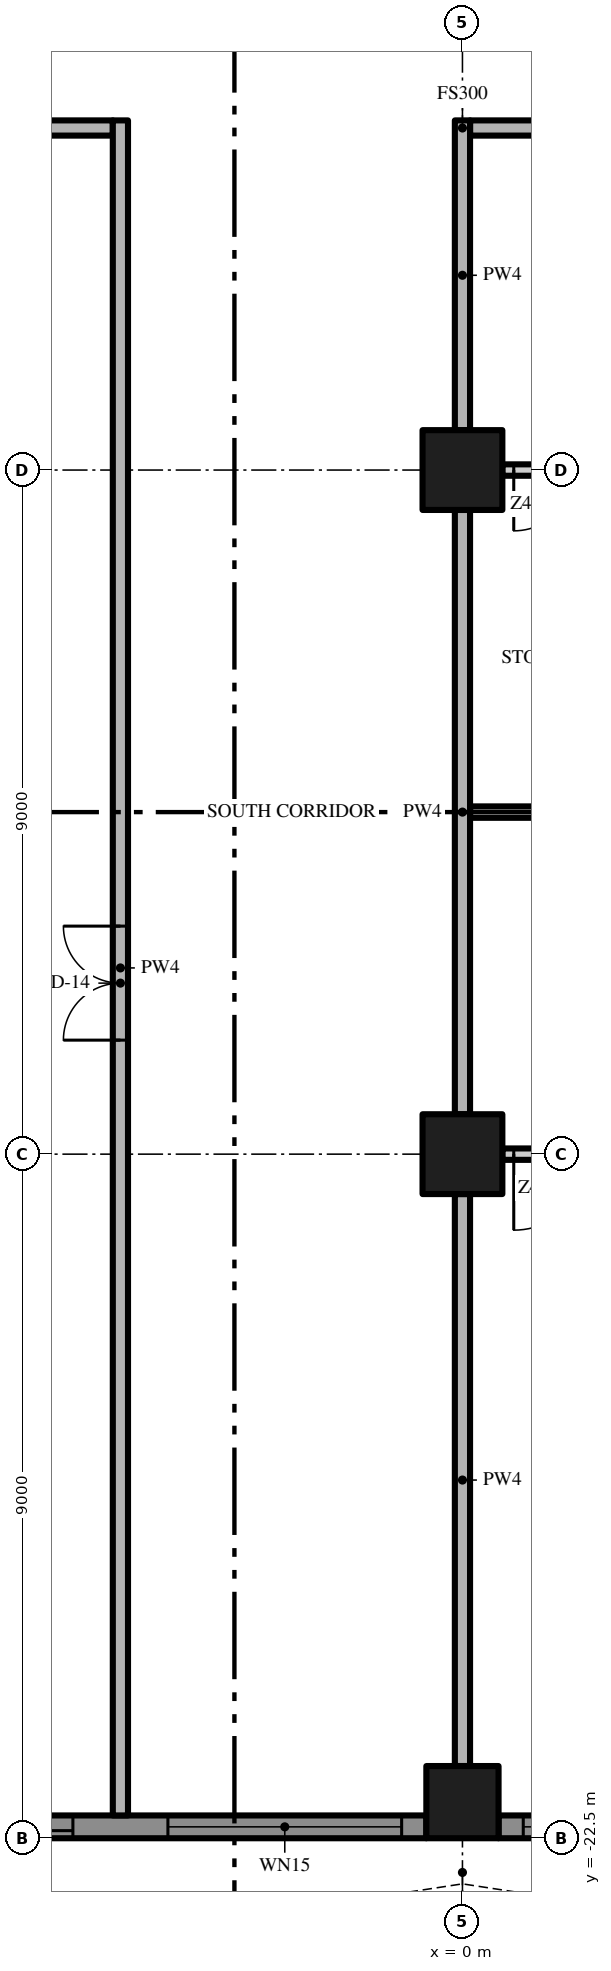
"""IFC4 building model, lengths in metres.
Left out: names, types, materials, properties, quantities, classifications, styles, units other than length and angle.
Written with IfcOpenShell. Run it as: python <this file> out.ifc"""

import sys

from ifc_helpers import new_model, si_unit, direction, frame, frame_2d, origin, origin_2d, place, context, subcontext, project, spatial, polyline, rectangle, outline, extrude, element, fill, save


model = new_model("IFC4")
c1 = context("Model", 3, precision=1e-05, world=origin(), true_north=direction((0.0, 1.0)))
c2 = subcontext(c1, "Body", "Model", "MODEL_VIEW")
j1 = project(units=[si_unit("LENGTHUNIT", "METRE"), si_unit("PLANEANGLEUNIT", "RADIAN")], contexts=[c1])
p1 = place(None, origin())
s1 = spatial("IfcSite", under=j1, at=p1, CompositionType="ELEMENT")
p2 = place(p1, origin())
s2 = spatial("IfcBuilding", under=s1, at=p2, CompositionType="ELEMENT")
p3 = place(p2, frame((0.0, 0.0, 218.6)))
s3 = spatial("IfcBuildingStorey", under=s2, at=p3, CompositionType="ELEMENT", Elevation=218.6)
p4 = place(p3, frame((0.0, -13.5, 0.0), z_axis=(0.0, 0.0, 1.0), x_axis=(1.0, 0.0, 0.0)))
e1 = element("IfcColumn", 1, at=p4, inside=s3, PredefinedType="COLUMN", context=c2, shape_type="SweptSolid", body=[
    extrude(rectangle(XDim=1.05, YDim=1.05, at=origin_2d()), origin(), (0.0, 0.0, 1.0), 3.5),
])
p5 = place(p3, frame((0.0, -22.025, 0.0), z_axis=(0.0, 0.0, 1.0), x_axis=(1.0, 0.0, 0.0)))
e2 = element("IfcColumn", 2, at=p5, inside=s3, PredefinedType="COLUMN", context=c2, shape_type="SweptSolid", body=[
    extrude(rectangle(XDim=0.95, YDim=0.95, at=origin_2d()), origin(), (0.0, 0.0, 1.0), 3.5),
])
p6 = place(p3, frame((0.0, -4.5, 0.0), z_axis=(0.0, 0.0, 1.0), x_axis=(1.0, 0.0, 0.0)))
e3 = element("IfcColumn", 3, at=p6, inside=s3, PredefinedType="COLUMN", context=c2, shape_type="SweptSolid", body=[
    extrude(rectangle(XDim=1.05, YDim=1.05, at=origin_2d()), origin(), (0.0, 0.0, 1.0), 3.5),
])
p7 = place(p3, frame((-0.475, -22.35, 0.0), z_axis=(0.0, 0.0, 1.0), x_axis=(-1.0, 0.0, 0.0)))
e4 = element("IfcWall", 4, at=p7, inside=s3, PredefinedType="SOLIDWALL", context=c2, shape_type="SweptSolid", body=[
    extrude(rectangle(XDim=8.05, YDim=0.3, at=frame_2d((4.025, 0.0))), origin(), (0.0, 0.0, 1.0), 3.5),
])
p8 = place(p7, frame((4.65, 0.0, 0.0)))
e5 = element("IfcOpeningElement", 5, at=p8, cuts=e4, PredefinedType="OPENING", context=c2, shape_type="SweptSolid", body=[
    extrude(rectangle(XDim=3.075, YDim=2.4, at=frame_2d((1.538, 1.2))), frame((0.0, 0.16, 0.0), z_axis=(0.0, -1.0, 0.0), x_axis=(1.0, 0.0, 0.0)), (0.0, 0.0, 1.0), 0.32),
])
p9 = place(p7, frame((0.325, 0.0, 0.45)))
e6 = element("IfcOpeningElement", 6, at=p9, cuts=e4, PredefinedType="OPENING", context=c2, shape_type="SweptSolid", body=[
    extrude(rectangle(XDim=3.075, YDim=2.65, at=frame_2d((1.538, 1.325))), frame((0.0, 0.16, 0.0), z_axis=(0.0, -1.0, 0.0), x_axis=(1.0, 0.0, 0.0)), (0.0, 0.0, 1.0), 0.32),
])
p10 = place(p3, frame((8.525, -22.35, 0.0), z_axis=(0.0, 0.0, 1.0), x_axis=(-1.0, 0.0, 0.0)))
e7 = element("IfcWall", 7, at=p10, inside=s3, PredefinedType="SOLIDWALL", context=c2, shape_type="SweptSolid", body=[
    extrude(rectangle(XDim=8.05, YDim=0.3, at=frame_2d((4.025, 0.0))), origin(), (0.0, 0.0, 1.0), 3.5),
])
p11 = place(p10, frame((4.65, 0.0, 0.45)))
e8 = element("IfcOpeningElement", 8, at=p11, cuts=e7, PredefinedType="OPENING", context=c2, shape_type="SweptSolid", body=[
    extrude(rectangle(XDim=3.075, YDim=2.65, at=frame_2d((1.538, 1.325))), frame((0.0, 0.16, 0.0), z_axis=(0.0, -1.0, 0.0), x_axis=(1.0, 0.0, 0.0)), (0.0, 0.0, 1.0), 0.32),
])
p12 = place(p10, frame((0.325, 0.0, 0.0)))
e9 = element("IfcOpeningElement", 9, at=p12, cuts=e7, PredefinedType="OPENING", context=c2, shape_type="SweptSolid", body=[
    extrude(rectangle(XDim=3.075, YDim=2.4, at=frame_2d((1.538, 1.2))), frame((0.0, 0.16, 0.0), z_axis=(0.0, -1.0, 0.0), x_axis=(1.0, 0.0, 0.0)), (0.0, 0.0, 1.0), 0.32),
])
p13 = place(p3, origin())
e10 = element("IfcWall", 10, at=p13, inside=s3, PredefinedType="USERDEFINED", context=c2, shape_type="SweptSolid", body=[
    extrude(outline(polyline([(-22.5, -25.5), (-21.0, -25.271), (-19.5, -24.671), (-18.0, -23.929), (-16.5, -23.329), (-15.0, -23.1), (-13.5, -23.329), (-12.0, -23.929), (-10.5, -24.671), (-9.0, -25.271), (-7.5, -25.5), (-6.0, -25.271), (-4.5, -24.671), (-3.0, -23.929), (-1.5, -23.329), (0.0, -23.1), (1.5, -23.329), (3.0, -23.929), (4.5, -24.671), (6.0, -25.271), (7.5, -25.5), (9.0, -25.271), (10.5, -24.671), (12.0, -23.929), (13.5, -23.329), (15.0, -23.1), (16.5, -23.329), (18.0, -23.929), (19.5, -24.671), (21.0, -25.271), (22.5, -25.5), (22.538, -25.253), (21.066, -25.028), (19.602, -24.442), (18.102, -23.701), (16.566, -23.086), (15.0, -22.847), (13.434, -23.086), (11.898, -23.701), (10.398, -24.442), (8.934, -25.028), (7.5, -25.247), (6.066, -25.028), (4.602, -24.442), (3.102, -23.701), (1.566, -23.086), (0.0, -22.847), (-1.566, -23.086), (-3.102, -23.701), (-4.602, -24.442), (-6.066, -25.028), (-7.5, -25.247), (-8.934, -25.028), (-10.398, -24.442), (-11.898, -23.701), (-13.434, -23.086), (-15.0, -22.847), (-16.566, -23.086), (-18.102, -23.701), (-19.602, -24.442), (-21.066, -25.028), (-22.538, -25.253), (-22.5, -25.5)])), origin(), (0.0, 0.0, 1.0), 0.9),
])
p14 = place(p3, frame((8.475, -13.5, 0.0), z_axis=(0.0, 0.0, 1.0), x_axis=(-1.0, 0.0, 0.0)))
e11 = element("IfcWall", 11, at=p14, inside=s3, PredefinedType="PARTITIONING", context=c2, shape_type="SweptSolid", body=[
    extrude(rectangle(XDim=7.95, YDim=0.15, at=frame_2d((3.975, 0.0))), origin(), (0.0, 0.0, 1.0), 3.5),
])
p15 = place(p14, frame((6.8, 0.0, 0.0)))
e12 = element("IfcOpeningElement", 12, at=p15, cuts=e11, PredefinedType="OPENING", context=c2, shape_type="SweptSolid", body=[
    extrude(rectangle(XDim=1.0, YDim=2.4, at=frame_2d((0.5, 1.2))), frame((0.0, 0.085, 0.0), z_axis=(0.0, -1.0, 0.0), x_axis=(1.0, 0.0, 0.0)), (0.0, 0.0, 1.0), 0.17),
])
p16 = place(p14, frame((0.15, 0.0, 0.0)))
e13 = element("IfcOpeningElement", 13, at=p16, cuts=e11, PredefinedType="OPENING", context=c2, shape_type="SweptSolid", body=[
    extrude(rectangle(XDim=1.0, YDim=2.4, at=frame_2d((0.5, 1.2))), frame((0.0, 0.085, 0.0), z_axis=(0.0, -1.0, 0.0), x_axis=(1.0, 0.0, 0.0)), (0.0, 0.0, 1.0), 0.17),
])
p17 = place(p3, frame((0.1, -9.0, 0.0), z_axis=(0.0, 0.0, 1.0), x_axis=(1.0, 0.0, 0.0)))
e14 = element("IfcWall", 14, at=p17, inside=s3, PredefinedType="PARTITIONING", context=c2, shape_type="SweptSolid", body=[
    extrude(rectangle(XDim=13.4, YDim=0.15, at=frame_2d((6.7, 0.0))), origin(), (0.0, 0.0, 1.0), 3.5),
])
p18 = place(p17, frame((6.9, 0.0, 0.0)))
e15 = element("IfcOpeningElement", 15, at=p18, cuts=e14, PredefinedType="OPENING", context=c2, shape_type="SweptSolid", body=[
    extrude(rectangle(XDim=1.0, YDim=2.4, at=frame_2d((0.5, 1.2))), frame((0.0, 0.085, 0.0), z_axis=(0.0, -1.0, 0.0), x_axis=(1.0, 0.0, 0.0)), (0.0, 0.0, 1.0), 0.17),
])
p19 = place(p3, frame((8.475, -4.5, 0.0), z_axis=(0.0, 0.0, 1.0), x_axis=(-1.0, 0.0, 0.0)))
e16 = element("IfcWall", 16, at=p19, inside=s3, PredefinedType="PARTITIONING", context=c2, shape_type="SweptSolid", body=[
    extrude(rectangle(XDim=7.95, YDim=0.15, at=frame_2d((3.975, 0.0))), origin(), (0.0, 0.0, 1.0), 3.5),
])
p20 = place(p19, frame((7.0, 0.0, 0.0)))
e17 = element("IfcOpeningElement", 17, at=p20, cuts=e16, PredefinedType="OPENING", context=c2, shape_type="SweptSolid", body=[
    extrude(rectangle(XDim=0.8, YDim=2.0, at=frame_2d((0.4, 1.0))), frame((0.0, 0.085, 0.0), z_axis=(0.0, -1.0, 0.0), x_axis=(1.0, 0.0, 0.0)), (0.0, 0.0, 1.0), 0.17),
])
p21 = place(p19, frame((4.925, 0.0, 0.0)))
e18 = element("IfcOpeningElement", 18, at=p21, cuts=e16, PredefinedType="OPENING", context=c2, shape_type="SweptSolid", body=[
    extrude(rectangle(XDim=0.8, YDim=2.0, at=frame_2d((0.4, 1.0))), frame((0.0, 0.085, 0.0), z_axis=(0.0, -1.0, 0.0), x_axis=(1.0, 0.0, 0.0)), (0.0, 0.0, 1.0), 0.17),
])
p22 = place(p3, frame((-17.4, 0.0, 0.0), z_axis=(0.0, 0.0, 1.0), x_axis=(1.0, 0.0, 0.0)))
e19 = element("IfcWall", 19, at=p22, inside=s3, PredefinedType="PARTITIONING", context=c2, shape_type="SweptSolid", body=[
    extrude(rectangle(XDim=12.8, YDim=0.2, at=frame_2d((6.4, 0.0))), origin(), (0.0, 0.0, 1.0), 3.5),
])
p23 = place(p3, frame((17.4, 0.0, 0.0), z_axis=(0.0, 0.0, 1.0), x_axis=(-1.0, 0.0, 0.0)))
e20 = element("IfcWall", 20, at=p23, inside=s3, PredefinedType="PARTITIONING", context=c2, shape_type="SweptSolid", body=[
    extrude(rectangle(XDim=17.3, YDim=0.2, at=frame_2d((8.65, 0.0))), origin(), (0.0, 0.0, 1.0), 3.5),
])
p24 = place(p23, frame((7.65, 0.0, 0.0)))
e21 = element("IfcOpeningElement", 21, at=p24, cuts=e20, PredefinedType="OPENING", context=c2, shape_type="SweptSolid", body=[
    extrude(rectangle(XDim=1.5, YDim=2.4, at=frame_2d((0.75, 1.2))), frame((0.0, 0.11, 0.0), z_axis=(0.0, -1.0, 0.0), x_axis=(1.0, 0.0, 0.0)), (0.0, 0.0, 1.0), 0.22),
])
p25 = place(p3, frame((-4.5, -22.2, 0.0), z_axis=(0.0, 0.0, 1.0), x_axis=(0.0, 1.0, 0.0)))
e22 = element("IfcWall", 22, at=p25, inside=s3, PredefinedType="PARTITIONING", context=c2, shape_type="SweptSolid", body=[
    extrude(rectangle(XDim=22.3, YDim=0.2, at=frame_2d((11.15, 0.0))), origin(), (0.0, 0.0, 1.0), 3.5),
])
p26 = place(p25, frame((10.2, 0.0, 0.0)))
e23 = element("IfcOpeningElement", 23, at=p26, cuts=e22, PredefinedType="OPENING", context=c2, shape_type="SweptSolid", body=[
    extrude(rectangle(XDim=1.5, YDim=2.4, at=frame_2d((0.75, 1.2))), frame((0.0, 0.11, 0.0), z_axis=(0.0, -1.0, 0.0), x_axis=(1.0, 0.0, 0.0)), (0.0, 0.0, 1.0), 0.22),
])
p27 = place(p3, frame((0.0, -21.55, 0.0), z_axis=(0.0, 0.0, 1.0), x_axis=(0.0, 1.0, 0.0)))
e24 = element("IfcWall", 24, at=p27, inside=s3, PredefinedType="PARTITIONING", context=c2, shape_type="SweptSolid", body=[
    extrude(rectangle(XDim=7.525, YDim=0.2, at=frame_2d((3.763, 0.0))), origin(), (0.0, 0.0, 1.0), 3.5),
])
p28 = place(p3, frame((0.0, -12.975, 0.0), z_axis=(0.0, 0.0, 1.0), x_axis=(0.0, 1.0, 0.0)))
e25 = element("IfcWall", 25, at=p28, inside=s3, PredefinedType="PARTITIONING", context=c2, shape_type="SweptSolid", body=[
    extrude(rectangle(XDim=7.95, YDim=0.2, at=frame_2d((3.975, 0.0))), origin(), (0.0, 0.0, 1.0), 3.5),
])
p29 = place(p3, frame((0.0, -3.975, 0.0), z_axis=(0.0, 0.0, 1.0), x_axis=(0.0, 1.0, 0.0)))
e26 = element("IfcWall", 26, at=p29, inside=s3, PredefinedType="PARTITIONING", context=c2, shape_type="SweptSolid", body=[
    extrude(rectangle(XDim=4.075, YDim=0.2, at=frame_2d((2.038, 0.0))), origin(), (0.0, 0.0, 1.0), 3.5),
])
p30 = place(p8, origin())
e27 = element("IfcDoor", 27, at=p30, inside=s3, OperationType="SINGLE_SWING_LEFT", PredefinedType="DOOR", context=c2, shape_type="SweptSolid", body=[
    extrude(rectangle(XDim=3.075, YDim=2.4, at=frame_2d((1.538, 1.2))), frame((0.0, 0.025, 0.0), z_axis=(0.0, -1.0, 0.0), x_axis=(1.0, 0.0, 0.0)), (0.0, 0.0, 1.0), 0.05),
])
fill(e5, e27)
p31 = place(p9, origin())
e28 = element("IfcWindow", 28, at=p31, inside=s3, PartitioningType="SINGLE_PANEL", PredefinedType="WINDOW", context=c2, shape_type="SweptSolid", body=[
    extrude(rectangle(XDim=3.075, YDim=2.65, at=frame_2d((1.538, 1.325))), frame((0.0, 0.03, 0.0), z_axis=(0.0, -1.0, 0.0), x_axis=(1.0, 0.0, 0.0)), (0.0, 0.0, 1.0), 0.06),
])
fill(e6, e28)
p32 = place(p11, origin())
e29 = element("IfcWindow", 29, at=p32, inside=s3, PartitioningType="SINGLE_PANEL", PredefinedType="WINDOW", context=c2, shape_type="SweptSolid", body=[
    extrude(rectangle(XDim=3.075, YDim=2.65, at=frame_2d((1.538, 1.325))), frame((0.0, 0.03, 0.0), z_axis=(0.0, -1.0, 0.0), x_axis=(1.0, 0.0, 0.0)), (0.0, 0.0, 1.0), 0.06),
])
fill(e8, e29)
p33 = place(p26, origin())
e30 = element("IfcDoor", 30, at=p33, inside=s3, OperationType="DOUBLE_DOOR_SINGLE_SWING", PredefinedType="DOOR", context=c2, shape_type="SweptSolid", body=[
    extrude(rectangle(XDim=1.5, YDim=2.4, at=frame_2d((0.75, 1.2))), frame((0.0, 0.025, 0.0), z_axis=(0.0, -1.0, 0.0), x_axis=(1.0, 0.0, 0.0)), (0.0, 0.0, 1.0), 0.05),
])
fill(e23, e30)
p34 = place(p20, origin())
e31 = element("IfcDoor", 31, at=p34, inside=s3, OperationType="SINGLE_SWING_RIGHT", PredefinedType="DOOR", context=c2, shape_type="SweptSolid", body=[
    extrude(rectangle(XDim=0.8, YDim=2.0, at=frame_2d((0.4, 1.0))), frame((0.0, 0.025, 0.0), z_axis=(0.0, -1.0, 0.0), x_axis=(1.0, 0.0, 0.0)), (0.0, 0.0, 1.0), 0.05),
])
fill(e17, e31)
p35 = place(p15, origin())
e32 = element("IfcDoor", 32, at=p35, inside=s3, OperationType="SINGLE_SWING_RIGHT", PredefinedType="DOOR", context=c2, shape_type="SweptSolid", body=[
    extrude(rectangle(XDim=1.0, YDim=2.4, at=frame_2d((0.5, 1.2))), frame((0.0, 0.025, 0.0), z_axis=(0.0, -1.0, 0.0), x_axis=(1.0, 0.0, 0.0)), (0.0, 0.0, 1.0), 0.05),
])
fill(e12, e32)
save(model, sys.argv[1])
